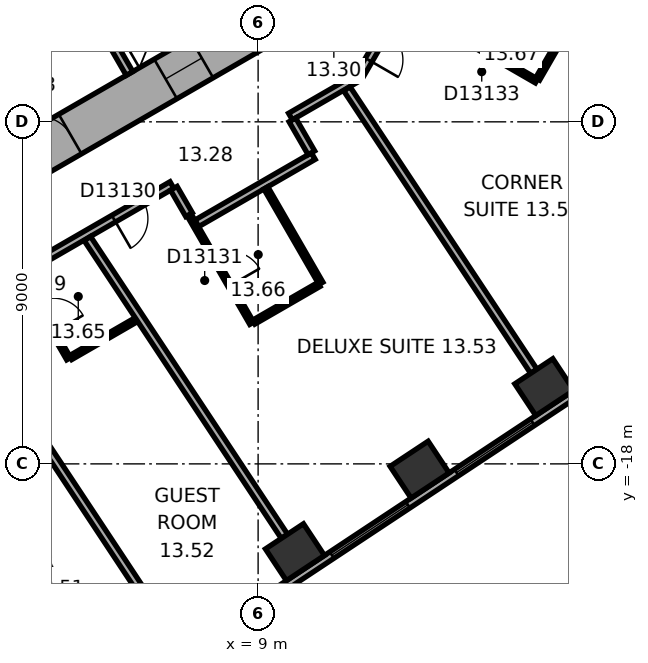
"""IFC4 building model, lengths in metres.
Left out: names, types, materials, properties, quantities, classifications, styles, units other than length and angle.
Written with IfcOpenShell. Run it as: python <this file> out.ifc"""

import sys

from ifc_helpers import new_model, si_unit, direction, frame, frame_2d, origin, origin_2d, place, context, subcontext, project, spatial, rectangle, extrude, element, fill, save


model = new_model("IFC4")
c1 = context("Model", 3, precision=1e-05, world=origin(), true_north=direction((0.0, 1.0)))
c2 = subcontext(c1, "Body", "Model", "MODEL_VIEW")
j1 = project(units=[si_unit("LENGTHUNIT", "METRE"), si_unit("PLANEANGLEUNIT", "RADIAN")], contexts=[c1])
p1 = place(None, origin())
s1 = spatial("IfcSite", under=j1, at=p1, CompositionType="ELEMENT")
p2 = place(p1, origin())
s2 = spatial("IfcBuilding", under=s1, at=p2, CompositionType="ELEMENT")
p3 = place(p2, frame((0.0, 0.0, 63.8)))
s3 = spatial("IfcBuildingStorey", under=s2, at=p3, CompositionType="ELEMENT", Elevation=63.8)
for number, where, z_axis, x_axis in (
    (1, (9.969, -20.324, 0.0), (0.0, 0.0, 1.0), (0.834, 0.552, 0.0)),
    (2, (13.25, -18.152, 0.0), (0.0, 0.0, 1.0), (0.834, 0.552, 0.0)),
    (3, (16.531, -15.981, 0.0), (0.0, 0.0, 1.0), (0.834, 0.552, 0.0)),
):
    element("IfcColumn", number, at=place(p3, frame(where, z_axis=z_axis, x_axis=x_axis)), inside=s3, PredefinedType="COLUMN", context=c2, shape_type="SweptSolid", body=[
        extrude(rectangle(XDim=1.2, YDim=1.0, at=origin_2d()), origin(), (0.0, 0.0, 1.0), 3.3),
    ])
p4 = place(p3, frame((-0.3, -11.836, 0.0), z_axis=(0.0, 0.0, 1.0), x_axis=(0.866021384402, 0.500006961711, 0.0)))
e4 = element("IfcWall", 4, at=p4, inside=s3, PredefinedType="SHEAR", context=c2, shape_type="SweptSolid", body=[
    extrude(rectangle(XDim=12.355, YDim=1.2, at=frame_2d((6.178, 0.0))), origin(), (0.0, 0.0, 1.0), 3.3),
])
p5 = place(p4, frame((4.128, 0.0, 0.0)))
e5 = element("IfcOpeningElement", 5, at=p5, cuts=e4, PredefinedType="OPENING", context=c2, shape_type="SweptSolid", body=[
    extrude(rectangle(XDim=0.9, YDim=2.1, at=frame_2d((0.45, 1.05))), frame((0.0, 0.61, 0.0), z_axis=(0.0, -1.0, 0.0), x_axis=(1.0, 0.0, 0.0)), (0.0, 0.0, 1.0), 1.22),
])
p6 = place(p4, frame((7.928, 0.0, 0.0)))
e6 = element("IfcOpeningElement", 6, at=p6, cuts=e4, PredefinedType="OPENING", context=c2, shape_type="SweptSolid", body=[
    extrude(rectangle(XDim=1.1, YDim=2.1, at=frame_2d((0.55, 1.05))), frame((0.0, 0.61, 0.0), z_axis=(0.0, -1.0, 0.0), x_axis=(1.0, 0.0, 0.0)), (0.0, 0.0, 1.0), 1.22),
])
p7 = place(p3, frame((3.083, -25.601, 0.0), z_axis=(0.0, 0.0, 1.0), x_axis=(0.833884295743, 0.551939291329, 0.0)))
e7 = element("IfcWall", 7, at=p7, inside=s3, PredefinedType="STANDARD", context=c2, shape_type="SweptSolid", body=[
    extrude(rectangle(XDim=21.246, YDim=0.2, at=frame_2d((10.623, 0.0))), origin(), (0.0, 0.0, 1.0), 3.3),
])
p8 = place(p7, frame((1.553, 0.0, 0.8)))
e8 = element("IfcOpeningElement", 8, at=p8, cuts=e7, PredefinedType="OPENING", context=c2, shape_type="SweptSolid", body=[
    extrude(rectangle(XDim=2.4, YDim=1.7, at=frame_2d((1.2, 0.85))), frame((0.0, 0.11, 0.0), z_axis=(0.0, -1.0, 0.0), x_axis=(1.0, 0.0, 0.0)), (0.0, 0.0, 1.0), 0.22),
])
p9 = place(p7, frame((5.488, 0.0, 0.8)))
e9 = element("IfcOpeningElement", 9, at=p9, cuts=e7, PredefinedType="OPENING", context=c2, shape_type="SweptSolid", body=[
    extrude(rectangle(XDim=2.4, YDim=1.7, at=frame_2d((1.2, 0.85))), frame((0.0, 0.11, 0.0), z_axis=(0.0, -1.0, 0.0), x_axis=(1.0, 0.0, 0.0)), (0.0, 0.0, 1.0), 0.22),
])
p10 = place(p7, frame((9.422, 0.0, 0.8)))
e10 = element("IfcOpeningElement", 10, at=p10, cuts=e7, PredefinedType="OPENING", context=c2, shape_type="SweptSolid", body=[
    extrude(rectangle(XDim=2.4, YDim=1.7, at=frame_2d((1.2, 0.85))), frame((0.0, 0.11, 0.0), z_axis=(0.0, -1.0, 0.0), x_axis=(1.0, 0.0, 0.0)), (0.0, 0.0, 1.0), 0.22),
])
p11 = place(p7, frame((13.357, 0.0, 0.8)))
e11 = element("IfcOpeningElement", 11, at=p11, cuts=e7, PredefinedType="OPENING", context=c2, shape_type="SweptSolid", body=[
    extrude(rectangle(XDim=2.4, YDim=1.7, at=frame_2d((1.2, 0.85))), frame((0.0, 0.11, 0.0), z_axis=(0.0, -1.0, 0.0), x_axis=(1.0, 0.0, 0.0)), (0.0, 0.0, 1.0), 0.22),
])
p12 = place(p7, frame((17.291, 0.0, 0.8)))
e12 = element("IfcOpeningElement", 12, at=p12, cuts=e7, PredefinedType="OPENING", context=c2, shape_type="SweptSolid", body=[
    extrude(rectangle(XDim=2.4, YDim=1.7, at=frame_2d((1.2, 0.85))), frame((0.0, 0.11, 0.0), z_axis=(0.0, -1.0, 0.0), x_axis=(1.0, 0.0, 0.0)), (0.0, 0.0, 1.0), 0.22),
])
p13 = place(p3, frame((-0.024, -8.559, 0.0), z_axis=(0.0, 0.0, 1.0), x_axis=(0.866026010844, 0.49999894854, 0.0)))
e13 = element("IfcWall", 13, at=p13, inside=s3, PredefinedType="PARTITIONING", context=c2, shape_type="SweptSolid", body=[
    extrude(rectangle(XDim=8.0, YDim=0.2, at=frame_2d((4.0, 0.0))), origin(), (0.0, 0.0, 1.0), 3.05),
])
p14 = place(p3, frame((4.516, -5.822, 0.0), z_axis=(0.0, 0.0, 1.0), x_axis=(0.499946605688, -0.86605622881, 0.0)))
e14 = element("IfcWall", 14, at=p14, inside=s3, PredefinedType="PARTITIONING", context=c2, shape_type="SweptSolid", body=[
    extrude(rectangle(XDim=2.2, YDim=0.2, at=frame_2d((1.1, 0.0))), origin(), (0.0, 0.0, 1.0), 3.05),
])
p15 = place(p3, frame((0.847, -7.767, 0.0), z_axis=(0.0, 0.0, 1.0), x_axis=(0.866027801685, 0.499995846692, 0.0)))
e15 = element("IfcWall", 15, at=p15, inside=s3, PredefinedType="SHEAR", context=c2, shape_type="SweptSolid", body=[
    extrude(rectangle(XDim=7.06, YDim=0.3, at=frame_2d((3.53, 0.0))), origin(), (0.0, 0.0, 1.0), 3.05),
])
p16 = place(p3, frame((1.033, -13.953, 0.0), z_axis=(0.0, 0.0, 1.0), x_axis=(0.866017531406, 0.500013635111, 0.0)))
e16 = element("IfcWall", 16, at=p16, inside=s3, PredefinedType="PARTITIONING", context=c2, shape_type="SweptSolid", body=[
    extrude(rectangle(XDim=6.58, YDim=0.2, at=frame_2d((3.29, 0.0))), origin(), (0.0, 0.0, 1.0), 3.05),
])
p17 = place(p16, frame((0.496, 0.0, 0.0)))
e17 = element("IfcOpeningElement", 17, at=p17, cuts=e16, PredefinedType="OPENING", context=c2, shape_type="SweptSolid", body=[
    extrude(rectangle(XDim=0.9, YDim=2.1, at=frame_2d((0.45, 1.05))), frame((0.0, 0.11, 0.0), z_axis=(0.0, -1.0, 0.0), x_axis=(1.0, 0.0, 0.0)), (0.0, 0.0, 1.0), 0.22),
])
p18 = place(p16, frame((4.811, 0.0, 0.0)))
e18 = element("IfcOpeningElement", 18, at=p18, cuts=e16, PredefinedType="OPENING", context=c2, shape_type="SweptSolid", body=[
    extrude(rectangle(XDim=0.9, YDim=2.1, at=frame_2d((0.45, 1.05))), frame((0.0, 0.11, 0.0), z_axis=(0.0, -1.0, 0.0), x_axis=(1.0, 0.0, 0.0)), (0.0, 0.0, 1.0), 0.22),
])
p19 = place(p3, frame((4.015, -15.233, 0.0), z_axis=(0.0, 0.0, 1.0), x_axis=(-0.499961950354, 0.866047370643, 0.0)))
e19 = element("IfcWall", 19, at=p19, inside=s3, PredefinedType="PARTITIONING", context=c2, shape_type="SweptSolid", body=[
    extrude(rectangle(XDim=2.5, YDim=0.12, at=frame_2d((1.25, 0.0))), origin(), (0.0, 0.0, 1.0), 3.05),
])
p20 = place(p19, frame((0.8, 0.0, 0.0)))
e20 = element("IfcOpeningElement", 20, at=p20, cuts=e19, PredefinedType="OPENING", context=c2, shape_type="SweptSolid", body=[
    extrude(rectangle(XDim=0.9, YDim=2.1, at=frame_2d((0.45, 1.05))), frame((0.0, 0.07, 0.0), z_axis=(0.0, -1.0, 0.0), x_axis=(1.0, 0.0, 0.0)), (0.0, 0.0, 1.0), 0.14),
])
p21 = place(p3, frame((5.798, -14.204, 0.0), z_axis=(0.0, 0.0, 1.0), x_axis=(-0.865972029493, -0.500092435591, 0.0)))
e21 = element("IfcWall", 21, at=p21, inside=s3, PredefinedType="PARTITIONING", context=c2, shape_type="SweptSolid", body=[
    extrude(rectangle(XDim=1.999, YDim=0.12, at=frame_2d((1.0, 0.0))), origin(), (0.0, 0.0, 1.0), 3.05),
])
p22 = place(p3, frame((6.412, -22.079, 0.0), z_axis=(0.0, 0.0, 1.0), x_axis=(-0.551919507115, 0.83389739037, 0.0)))
e22 = element("IfcWall", 22, at=p22, inside=s3, PredefinedType="PARTITIONING", context=c2, shape_type="SweptSolid", body=[
    extrude(rectangle(XDim=9.635, YDim=0.2, at=frame_2d((4.817, 0.0))), origin(), (0.0, 0.0, 1.0), 3.05),
])
p23 = place(p3, frame((6.782, -10.749, 0.0), z_axis=(0.0, 0.0, 1.0), x_axis=(0.500170954823, -0.865926680471, 0.0)))
e23 = element("IfcWall", 23, at=p23, inside=s3, PredefinedType="PARTITIONING", context=c2, shape_type="SweptSolid", body=[
    extrude(rectangle(XDim=0.801, YDim=0.2, at=frame_2d((0.4, 0.0))), origin(), (0.0, 0.0, 1.0), 3.05),
])
p24 = place(p3, frame((7.385, -11.673, 0.0), z_axis=(0.0, 0.0, 1.0), x_axis=(0.866037524642, 0.499979005472, 0.0)))
e24 = element("IfcWall", 24, at=p24, inside=s3, PredefinedType="PARTITIONING", context=c2, shape_type="SweptSolid", body=[
    extrude(rectangle(XDim=3.542, YDim=0.2, at=frame_2d((1.771, 0.0))), origin(), (0.0, 0.0, 1.0), 3.05),
])
p25 = place(p3, frame((8.833, -14.301, 0.0), z_axis=(0.0, 0.0, 1.0), x_axis=(-0.499936836718, 0.866061868051, 0.0)))
e25 = element("IfcWall", 25, at=p25, inside=s3, PredefinedType="PARTITIONING", context=c2, shape_type="SweptSolid", body=[
    extrude(rectangle(XDim=3.188, YDim=0.12, at=frame_2d((1.594, 0.0))), origin(), (0.0, 0.0, 1.0), 3.05),
])
p26 = place(p25, frame((1.144, 0.0, 0.0)))
e26 = element("IfcOpeningElement", 26, at=p26, cuts=e25, PredefinedType="OPENING", context=c2, shape_type="SweptSolid", body=[
    extrude(rectangle(XDim=0.9, YDim=2.1, at=frame_2d((0.45, 1.05))), frame((0.0, 0.07, 0.0), z_axis=(0.0, -1.0, 0.0), x_axis=(1.0, 0.0, 0.0)), (0.0, 0.0, 1.0), 0.14),
])
p27 = place(p3, frame((9.203, -10.738, 0.0), z_axis=(0.0, 0.0, 1.0), x_axis=(0.50005036918, -0.865996321171, 0.0)))
e27 = element("IfcWall", 27, at=p27, inside=s3, PredefinedType="PARTITIONING", context=c2, shape_type="SweptSolid", body=[
    extrude(rectangle(XDim=2.9, YDim=0.12, at=frame_2d((1.45, 0.0))), origin(), (0.0, 0.0, 1.0), 3.05),
])
p28 = place(p3, frame((9.693, -19.907, 0.0), z_axis=(0.0, 0.0, 1.0), x_axis=(-0.551938394837, 0.833884889121, 0.0)))
e28 = element("IfcWall", 28, at=p28, inside=s3, PredefinedType="PARTITIONING", context=c2, shape_type="SweptSolid", body=[
    extrude(rectangle(XDim=9.394, YDim=0.2, at=frame_2d((4.697, 0.0))), origin(), (0.0, 0.0, 1.0), 2.6),
])
p29 = place(p3, frame((9.852, -8.861, 0.0), z_axis=(0.0, 0.0, 1.0), x_axis=(0.866013291437, 0.500020978615, 0.0)))
e29 = element("IfcWall", 29, at=p29, inside=s3, PredefinedType="PARTITIONING", context=c2, shape_type="SweptSolid", body=[
    extrude(rectangle(XDim=2.077, YDim=0.2, at=frame_2d((1.038, 0.0))), origin(), (0.0, 0.0, 1.0), 3.05),
])
p30 = place(p3, frame((10.402, -9.815, 0.0), z_axis=(0.0, 0.0, 1.0), x_axis=(-0.499968756647, 0.866043441391, 0.0)))
e30 = element("IfcWall", 30, at=p30, inside=s3, PredefinedType="PARTITIONING", context=c2, shape_type="SweptSolid", body=[
    extrude(rectangle(XDim=1.001, YDim=0.2, at=frame_2d((0.5, 0.0))), origin(), (0.0, 0.0, 1.0), 3.05),
])
p31 = place(p3, frame((10.601, -13.28, 0.0), z_axis=(0.0, 0.0, 1.0), x_axis=(-0.866044057189, -0.499967689963, 0.0)))
e31 = element("IfcWall", 31, at=p31, inside=s3, PredefinedType="PARTITIONING", context=c2, shape_type="SweptSolid", body=[
    extrude(rectangle(XDim=1.982, YDim=0.12, at=frame_2d((0.991, 0.0))), origin(), (0.0, 0.0, 1.0), 3.05),
])
p32 = place(p3, frame((11.67, -7.788, 0.0), z_axis=(0.0, 0.0, 1.0), x_axis=(0.500063286585, 0.865988862174, 0.0)))
e32 = element("IfcWall", 32, at=p32, inside=s3, PredefinedType="PARTITIONING", context=c2, shape_type="SweptSolid", body=[
    extrude(rectangle(XDim=1.86, YDim=0.2, at=frame_2d((0.93, 0.0))), origin(), (0.0, 0.0, 1.0), 3.05),
])
p33 = place(p32, frame((0.48, 0.0, 0.0)))
e33 = element("IfcOpeningElement", 33, at=p33, cuts=e32, PredefinedType="OPENING", context=c2, shape_type="SweptSolid", body=[
    extrude(rectangle(XDim=0.9, YDim=2.1, at=frame_2d((0.45, 1.05))), frame((0.0, 0.11, 0.0), z_axis=(0.0, -1.0, 0.0), x_axis=(1.0, 0.0, 0.0)), (0.0, 0.0, 1.0), 0.22),
])
p34 = place(p3, frame((16.255, -15.564, 0.0), z_axis=(0.0, 0.0, 1.0), x_axis=(-0.55192208744, 0.833895682562, 0.0)))
e34 = element("IfcWall", 34, at=p34, inside=s3, PredefinedType="PARTITIONING", context=c2, shape_type="SweptSolid", body=[
    extrude(rectangle(XDim=8.913, YDim=0.2, at=frame_2d((4.457, 0.0))), origin(), (0.0, 0.0, 1.0), 2.6),
])
p35 = place(p3, frame((16.326, -7.925, 0.0), z_axis=(0.0, 0.0, 1.0), x_axis=(-0.865997131366, 0.500048966069, 0.0)))
e35 = element("IfcWall", 35, at=p35, inside=s3, PredefinedType="PARTITIONING", context=c2, shape_type="SweptSolid", body=[
    extrude(rectangle(XDim=2.74, YDim=0.12, at=frame_2d((1.37, 0.0))), origin(), (0.0, 0.0, 1.0), 3.05),
])
p36 = place(p35, frame((0.92, 0.0, 0.0)))
e36 = element("IfcOpeningElement", 36, at=p36, cuts=e35, PredefinedType="OPENING", context=c2, shape_type="SweptSolid", body=[
    extrude(rectangle(XDim=0.9, YDim=2.1, at=frame_2d((0.45, 1.05))), frame((0.0, 0.07, 0.0), z_axis=(0.0, -1.0, 0.0), x_axis=(1.0, 0.0, 0.0)), (0.0, 0.0, 1.0), 0.14),
])
p37 = place(p3, frame((17.396, -6.071, 0.0), z_axis=(0.0, 0.0, 1.0), x_axis=(-0.500027264788, -0.866009661879, 0.0)))
e37 = element("IfcWall", 37, at=p37, inside=s3, PredefinedType="PARTITIONING", context=c2, shape_type="SweptSolid", body=[
    extrude(rectangle(XDim=2.08, YDim=0.12, at=frame_2d((1.04, 0.0))), origin(), (0.0, 0.0, 1.0), 3.05),
])
p38 = place(p10, origin())
e38 = element("IfcWindow", 38, at=p38, inside=s3, PartitioningType="SINGLE_PANEL", PredefinedType="WINDOW", context=c2, shape_type="SweptSolid", body=[
    extrude(rectangle(XDim=2.4, YDim=1.7, at=frame_2d((1.2, 0.85))), frame((0.0, 0.03, 0.0), z_axis=(0.0, -1.0, 0.0), x_axis=(1.0, 0.0, 0.0)), (0.0, 0.0, 1.0), 0.06),
])
fill(e10, e38)
p39 = place(p11, origin())
e39 = element("IfcWindow", 39, at=p39, inside=s3, PartitioningType="SINGLE_PANEL", PredefinedType="WINDOW", context=c2, shape_type="SweptSolid", body=[
    extrude(rectangle(XDim=2.4, YDim=1.7, at=frame_2d((1.2, 0.85))), frame((0.0, 0.03, 0.0), z_axis=(0.0, -1.0, 0.0), x_axis=(1.0, 0.0, 0.0)), (0.0, 0.0, 1.0), 0.06),
])
fill(e11, e39)
p40 = place(p5, origin())
e40 = element("IfcDoor", 40, at=p40, inside=s3, OperationType="SINGLE_SWING_LEFT", PredefinedType="DOOR", context=c2, shape_type="SweptSolid", body=[
    extrude(rectangle(XDim=0.9, YDim=2.1, at=frame_2d((0.45, 1.05))), frame((0.0, 0.025, 0.0), z_axis=(0.0, -1.0, 0.0), x_axis=(1.0, 0.0, 0.0)), (0.0, 0.0, 1.0), 0.05),
])
fill(e5, e40)
p41 = place(p6, origin())
e41 = element("IfcDoor", 41, at=p41, inside=s3, OperationType="DOUBLE_DOOR_SLIDING", PredefinedType="DOOR", context=c2, shape_type="SweptSolid", body=[
    extrude(rectangle(XDim=1.1, YDim=2.1, at=frame_2d((0.55, 1.05))), frame((0.0, 0.025, 0.0), z_axis=(0.0, -1.0, 0.0), x_axis=(1.0, 0.0, 0.0)), (0.0, 0.0, 1.0), 0.05),
])
fill(e6, e41)
p42 = place(p20, origin())
e42 = element("IfcDoor", 42, at=p42, inside=s3, OperationType="SINGLE_SWING_LEFT", PredefinedType="DOOR", context=c2, shape_type="SweptSolid", body=[
    extrude(rectangle(XDim=0.9, YDim=2.1, at=frame_2d((0.45, 1.05))), frame((0.0, 0.025, 0.0), z_axis=(0.0, -1.0, 0.0), x_axis=(1.0, 0.0, 0.0)), (0.0, 0.0, 1.0), 0.05),
])
fill(e20, e42)
p43 = place(p18, origin())
e43 = element("IfcDoor", 43, at=p43, inside=s3, OperationType="SINGLE_SWING_LEFT", PredefinedType="DOOR", context=c2, shape_type="SweptSolid", body=[
    extrude(rectangle(XDim=0.9, YDim=2.1, at=frame_2d((0.45, 1.05))), frame((0.0, 0.025, 0.0), z_axis=(0.0, -1.0, 0.0), x_axis=(1.0, 0.0, 0.0)), (0.0, 0.0, 1.0), 0.05),
])
fill(e18, e43)
p44 = place(p26, origin())
e44 = element("IfcDoor", 44, at=p44, inside=s3, OperationType="SINGLE_SWING_LEFT", PredefinedType="DOOR", context=c2, shape_type="SweptSolid", body=[
    extrude(rectangle(XDim=0.9, YDim=2.1, at=frame_2d((0.45, 1.05))), frame((0.0, 0.025, 0.0), z_axis=(0.0, -1.0, 0.0), x_axis=(1.0, 0.0, 0.0)), (0.0, 0.0, 1.0), 0.05),
])
fill(e26, e44)
p45 = place(p33, origin())
e45 = element("IfcDoor", 45, at=p45, inside=s3, OperationType="SINGLE_SWING_LEFT", PredefinedType="DOOR", context=c2, shape_type="SweptSolid", body=[
    extrude(rectangle(XDim=0.9, YDim=2.1, at=frame_2d((0.45, 1.05))), frame((0.0, 0.025, 0.0), z_axis=(0.0, -1.0, 0.0), x_axis=(1.0, 0.0, 0.0)), (0.0, 0.0, 1.0), 0.05),
])
fill(e33, e45)
p46 = place(p36, origin())
e46 = element("IfcDoor", 46, at=p46, inside=s3, OperationType="SINGLE_SWING_LEFT", PredefinedType="DOOR", context=c2, shape_type="SweptSolid", body=[
    extrude(rectangle(XDim=0.9, YDim=2.1, at=frame_2d((0.45, 1.05))), frame((0.0, 0.025, 0.0), z_axis=(0.0, -1.0, 0.0), x_axis=(1.0, 0.0, 0.0)), (0.0, 0.0, 1.0), 0.05),
])
fill(e36, e46)
save(model, sys.argv[1])
